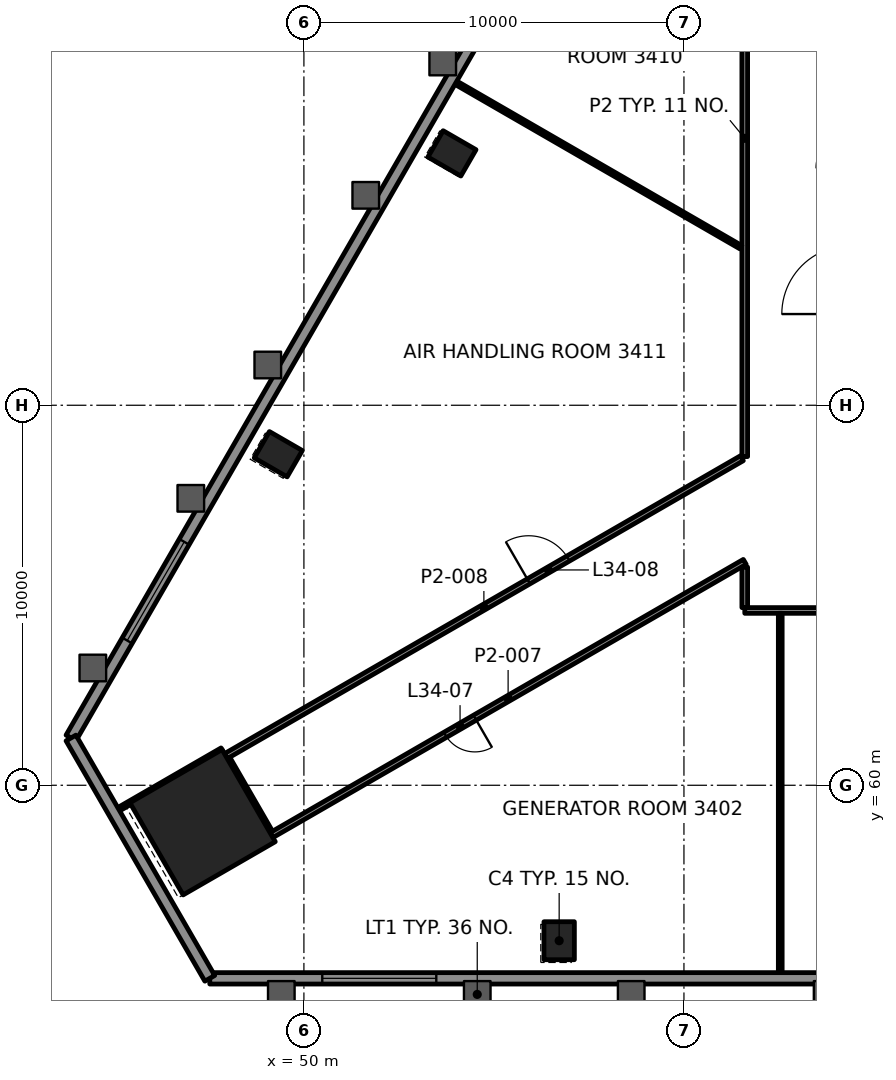
"""IFC4 building model, lengths in metres.
Left out: names, types, materials, properties, quantities, classifications, styles, units other than length and angle.
Written with IfcOpenShell. Run it as: python <this file> out.ifc"""

import sys

from ifc_helpers import new_model, si_unit, direction, frame, frame_2d, origin, origin_2d, place, context, subcontext, project, spatial, rectangle, hollow_rectangle, extrude, element, fill, save


model = new_model("IFC4")
c1 = context("Model", 3, precision=1e-05, world=origin(), true_north=direction((0.0, 1.0)))
c2 = subcontext(c1, "Body", "Model", "MODEL_VIEW")
j1 = project(units=[si_unit("LENGTHUNIT", "METRE"), si_unit("PLANEANGLEUNIT", "RADIAN")], contexts=[c1])
p1 = place(None, origin())
s1 = spatial("IfcSite", under=j1, at=p1, CompositionType="ELEMENT")
p2 = place(p1, origin())
s2 = spatial("IfcBuilding", under=s1, at=p2, CompositionType="ELEMENT")
p3 = place(p2, frame((0.0, 0.0, 151.3)))
s3 = spatial("IfcBuildingStorey", under=s2, at=p3, CompositionType="ELEMENT", Elevation=151.3)
p4 = place(p3, frame((47.334, 59.027, 0.0), z_axis=(0.0, 0.0, 1.0), x_axis=(0.5, -0.866025403784, 0.0)))
e1 = element("IfcColumn", 1, at=p4, inside=s3, PredefinedType="COLUMN", context=c2, shape_type="SweptSolid", body=[
    extrude(rectangle(XDim=2.8, YDim=2.8, at=origin_2d()), origin(), (0.0, 0.0, 1.0), 4.5),
])
for number, where, z_axis, x_axis in (
    (2, (56.717, 55.909, -0.0), (0.0, 0.0, 1.0), (1.0, 0.0, 0.0)),
    (3, (53.896, 76.628, -0.0), (0.0, 0.0, 1.0), (-0.5, -0.866, 0.0)),
    (4, (49.325, 68.711, -0.0), (0.0, 0.0, 1.0), (-0.5, -0.866, 0.0)),
):
    element("IfcColumn", number, at=place(p3, frame(where, z_axis=z_axis, x_axis=x_axis)), inside=s3, PredefinedType="COLUMN", context=c2, shape_type="SweptSolid", body=[
        extrude(hollow_rectangle(XDim=0.8, YDim=1.0, WallThickness=0.05, at=origin_2d()), origin(), (0.0, 0.0, 1.0), 4.5),
    ])
p5 = place(p3, frame((88.399, 64.6, 0.0), z_axis=(0.0, 0.0, 1.0), x_axis=(-1.0, 0.0, 0.0)))
e5 = element("IfcWall", 5, at=p5, inside=s3, PredefinedType="PARTITIONING", context=c2, shape_type="SweptSolid", body=[
    extrude(rectangle(XDim=26.799, YDim=0.15, at=frame_2d((13.399, 0.0))), origin(), (0.0, 0.0, 1.0), 3.7),
])
p6 = place(p5, frame((6.201, 0.0, 0.0)))
e6 = element("IfcOpeningElement", 6, at=p6, cuts=e5, PredefinedType="OPENING", context=c2, shape_type="SweptSolid", body=[
    extrude(rectangle(XDim=1.2, YDim=2.1, at=frame_2d((0.6, 1.05))), frame((0.0, 0.085, 0.0), z_axis=(0.0, -1.0, 0.0), x_axis=(1.0, 0.0, 0.0)), (0.0, 0.0, 1.0), 0.17),
])
p7 = place(p5, frame((19.182, 0.0, 0.0)))
e7 = element("IfcOpeningElement", 7, at=p7, cuts=e5, PredefinedType="OPENING", context=c2, shape_type="SweptSolid", body=[
    extrude(rectangle(XDim=0.9, YDim=2.1, at=frame_2d((0.45, 1.05))), frame((0.0, 0.085, 0.0), z_axis=(0.0, -1.0, 0.0), x_axis=(1.0, 0.0, 0.0)), (0.0, 0.0, 1.0), 0.17),
])
p8 = place(p3, frame((61.6, 65.878, 0.0), z_axis=(0.0, 0.0, 1.0), x_axis=(-0.866021599452, -0.500006589238, 0.0)))
e8 = element("IfcWall", 8, at=p8, inside=s3, PredefinedType="PARTITIONING", context=c2, shape_type="SweptSolid", body=[
    extrude(rectangle(XDim=14.38, YDim=0.15, at=frame_2d((7.19, 0.0))), origin(), (0.0, 0.0, 1.0), 3.7),
])
p9 = place(p8, frame((8.2, 0.0, 0.0)))
e9 = element("IfcOpeningElement", 9, at=p9, cuts=e8, PredefinedType="OPENING", context=c2, shape_type="SweptSolid", body=[
    extrude(rectangle(XDim=0.9, YDim=2.1, at=frame_2d((0.45, 1.05))), frame((0.0, 0.085, 0.0), z_axis=(0.0, -1.0, 0.0), x_axis=(1.0, 0.0, 0.0)), (0.0, 0.0, 1.0), 0.17),
])
p10 = place(p3, frame((47.946, 60.766, 0.0), z_axis=(0.0, 0.0, 1.0), x_axis=(0.866025857359, 0.499999214385, 0.0)))
e10 = element("IfcWall", 10, at=p10, inside=s3, PredefinedType="PARTITIONING", context=c2, shape_type="SweptSolid", body=[
    extrude(rectangle(XDim=15.679, YDim=0.15, at=frame_2d((7.84, 0.0))), origin(), (0.0, 0.0, 1.0), 3.7),
])
p11 = place(p10, frame((9.2, 0.0, 0.0)))
e11 = element("IfcOpeningElement", 11, at=p11, cuts=e10, PredefinedType="OPENING", context=c2, shape_type="SweptSolid", body=[
    extrude(rectangle(XDim=1.2, YDim=2.1, at=frame_2d((0.6, 1.05))), frame((0.0, 0.085, 0.0), z_axis=(0.0, -1.0, 0.0), x_axis=(1.0, 0.0, 0.0)), (0.0, 0.0, 1.0), 0.17),
])
p12 = place(p3, frame((45.023, 59.31, 0.0), z_axis=(0.0, 0.0, 1.0), x_axis=(0.866035906198, 0.499981808845, 0.0)))
e12 = element("IfcWall", 12, at=p12, inside=s3, PredefinedType="PARTITIONING", context=c2, shape_type="SweptSolid", body=[
    extrude(rectangle(XDim=3.259, YDim=0.1, at=frame_2d((1.63, 0.0))), origin(), (0.0, 0.0, 1.0), 3.7),
])
p13 = place(p3, frame((62.534, 54.949, 0.0), z_axis=(0.0, 0.0, 1.0), x_axis=(0.0, 1.0, 0.0)))
e13 = element("IfcWall", 13, at=p13, inside=s3, PredefinedType="PARTITIONING", context=c2, shape_type="SweptSolid", body=[
    extrude(rectangle(XDim=9.576, YDim=0.1, at=frame_2d((4.788, 0.0))), origin(), (0.0, 0.0, 1.0), 3.7),
])
p14 = place(p3, frame((61.6, 64.676, 0.0), z_axis=(0.0, 0.0, 1.0), x_axis=(0.0, 1.0, 0.0)))
e14 = element("IfcWall", 14, at=p14, inside=s3, PredefinedType="PARTITIONING", context=c2, shape_type="SweptSolid", body=[
    extrude(rectangle(XDim=1.066, YDim=0.15, at=frame_2d((0.533, 0.0))), origin(), (0.0, 0.0, 1.0), 3.7),
])
p15 = place(p3, frame((61.6, 68.649, 0.0), z_axis=(0.0, 0.0, 1.0), x_axis=(0.0, 1.0, 0.0)))
e15 = element("IfcWall", 15, at=p15, inside=s3, PredefinedType="PARTITIONING", context=c2, shape_type="SweptSolid", body=[
    extrude(rectangle(XDim=16.75, YDim=0.15, at=frame_2d((8.375, 0.0))), origin(), (0.0, 0.0, 1.0), 3.7),
])
p16 = place(p3, frame((49.109, 58.753, 0.0), z_axis=(0.0, 0.0, 1.0), x_axis=(-0.49994221372, 0.866058764138, 0.0)))
e16 = element("IfcWall", 16, at=p16, inside=s3, PredefinedType="PARTITIONING", context=c2, shape_type="SweptSolid", body=[
    extrude(rectangle(XDim=2.244, YDim=0.15, at=frame_2d((1.122, 0.0))), origin(), (0.0, 0.0, 1.0), 3.7),
])
p17 = place(p3, frame((61.499, 74.158, 0.0), z_axis=(0.0, 0.0, 1.0), x_axis=(-0.866030454263, 0.499991252212, 0.0)))
e17 = element("IfcWall", 17, at=p17, inside=s3, PredefinedType="PARTITIONING", context=c2, shape_type="SweptSolid", body=[
    extrude(rectangle(XDim=8.78, YDim=0.1, at=frame_2d((4.39, 0.0))), origin(), (0.0, 0.0, 1.0), 3.7),
])
p18 = place(p3, frame((47.523, 54.919, 0.0), z_axis=(0.0, 0.0, 1.0), x_axis=(1.0, 0.0, 0.0)))
e18 = element("IfcWall", 18, at=p18, inside=s3, PredefinedType="SOLIDWALL", context=c2, shape_type="SweptSolid", body=[
    extrude(rectangle(XDim=54.954, YDim=0.3, at=frame_2d((27.477, 0.0))), origin(), (0.0, 0.0, 1.0), 4.3),
])
p19 = place(p18, frame((2.96, 0.0, 0.8)))
e19 = element("IfcOpeningElement", 19, at=p19, cuts=e18, PredefinedType="OPENING", context=c2, shape_type="SweptSolid", body=[
    extrude(rectangle(XDim=3.0, YDim=2.4, at=frame_2d((1.5, 1.2))), frame((0.0, 0.16, 0.0), z_axis=(0.0, -1.0, 0.0), x_axis=(1.0, 0.0, 0.0)), (0.0, 0.0, 1.0), 0.32),
])
p20 = place(p18, frame((48.994, 0.0, 0.8)))
e20 = element("IfcOpeningElement", 20, at=p20, cuts=e18, PredefinedType="OPENING", context=c2, shape_type="SweptSolid", body=[
    extrude(rectangle(XDim=3.0, YDim=2.4, at=frame_2d((1.5, 1.2))), frame((0.0, 0.16, 0.0), z_axis=(0.0, -1.0, 0.0), x_axis=(1.0, 0.0, 0.0)), (0.0, 0.0, 1.0), 0.32),
])
p21 = place(p3, frame((71.348, 108.836, 0.0), z_axis=(0.0, 0.0, 1.0), x_axis=(-0.500000750612, -0.866024970418, 0.0)))
e21 = element("IfcWall", 21, at=p21, inside=s3, PredefinedType="SOLIDWALL", context=c2, shape_type="SweptSolid", body=[
    extrude(rectangle(XDim=54.954, YDim=0.3, at=frame_2d((27.477, 0.0))), origin(), (0.0, 0.0, 1.0), 4.3),
])
p22 = place(p21, frame((2.96, 0.0, 0.8)))
e22 = element("IfcOpeningElement", 22, at=p22, cuts=e21, PredefinedType="OPENING", context=c2, shape_type="SweptSolid", body=[
    extrude(rectangle(XDim=3.0, YDim=2.4, at=frame_2d((1.5, 1.2))), frame((0.0, 0.16, 0.0), z_axis=(0.0, -1.0, 0.0), x_axis=(1.0, 0.0, 0.0)), (0.0, 0.0, 1.0), 0.32),
])
p23 = place(p21, frame((48.994, 0.0, 0.8)))
e23 = element("IfcOpeningElement", 23, at=p23, cuts=e21, PredefinedType="OPENING", context=c2, shape_type="SweptSolid", body=[
    extrude(rectangle(XDim=3.0, YDim=2.4, at=frame_2d((1.5, 1.2))), frame((0.0, 0.16, 0.0), z_axis=(0.0, -1.0, 0.0), x_axis=(1.0, 0.0, 0.0)), (0.0, 0.0, 1.0), 0.32),
])
p24 = place(p3, frame((43.871, 61.245, 0.0), z_axis=(0.0, 0.0, 1.0), x_axis=(0.499985757347, -0.866033626628, 0.0)))
e24 = element("IfcWall", 24, at=p24, inside=s3, PredefinedType="SOLIDWALL", context=c2, shape_type="SweptSolid", body=[
    extrude(rectangle(XDim=7.304, YDim=0.3, at=frame_2d((3.652, 0.0))), origin(), (0.0, 0.0, 1.0), 4.3),
])
p25 = place(p9, origin())
e25 = element("IfcDoor", 25, at=p25, inside=s3, OperationType="SINGLE_SWING_RIGHT", PredefinedType="DOOR", context=c2, shape_type="SweptSolid", body=[
    extrude(rectangle(XDim=0.9, YDim=2.1, at=frame_2d((0.45, 1.05))), frame((0.0, 0.025, 0.0), z_axis=(0.0, -1.0, 0.0), x_axis=(1.0, 0.0, 0.0)), (0.0, 0.0, 1.0), 0.05),
])
fill(e9, e25)
p26 = place(p11, origin())
e26 = element("IfcDoor", 26, at=p26, inside=s3, OperationType="DOUBLE_DOOR_SINGLE_SWING", PredefinedType="DOOR", context=c2, shape_type="SweptSolid", body=[
    extrude(rectangle(XDim=1.2, YDim=2.1, at=frame_2d((0.6, 1.05))), frame((0.0, 0.025, 0.0), z_axis=(0.0, -1.0, 0.0), x_axis=(1.0, 0.0, 0.0)), (0.0, 0.0, 1.0), 0.05),
])
fill(e11, e26)
p27 = place(p19, origin())
e27 = element("IfcWindow", 27, at=p27, inside=s3, PartitioningType="SINGLE_PANEL", PredefinedType="WINDOW", context=c2, shape_type="SweptSolid", body=[
    extrude(rectangle(XDim=3.0, YDim=2.4, at=frame_2d((1.5, 1.2))), frame((0.0, 0.03, 0.0), z_axis=(0.0, -1.0, 0.0), x_axis=(1.0, 0.0, 0.0)), (0.0, 0.0, 1.0), 0.06),
])
fill(e19, e27)
p28 = place(p23, origin())
e28 = element("IfcWindow", 28, at=p28, inside=s3, PartitioningType="SINGLE_PANEL", PredefinedType="WINDOW", context=c2, shape_type="SweptSolid", body=[
    extrude(rectangle(XDim=3.0, YDim=2.4, at=frame_2d((1.5, 1.2))), frame((0.0, 0.03, 0.0), z_axis=(0.0, -1.0, 0.0), x_axis=(1.0, 0.0, 0.0)), (0.0, 0.0, 1.0), 0.06),
])
fill(e23, e28)
save(model, sys.argv[1])
